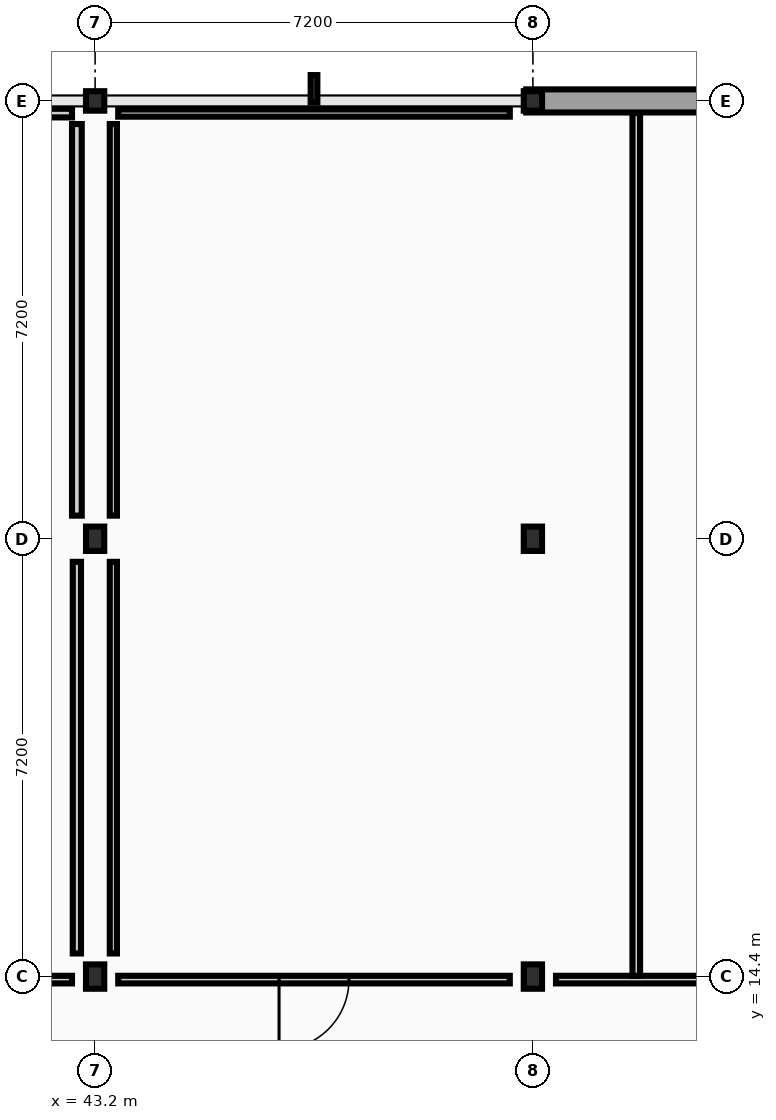
"""IFC4 building model, lengths in metres.
Left out: names, types, materials, properties, quantities, classifications, styles, units other than length and angle.
Written with IfcOpenShell. Run it as: python <this file> out.ifc"""

import sys

from ifc_helpers import new_model, si_unit, direction, frame, frame_2d, origin, origin_2d, place, context, subcontext, project, spatial, rectangle, i_section, extrude, element, fill, save


model = new_model("IFC4")
c1 = context("Model", 3, precision=1e-05, world=origin(), true_north=direction((0.0, 1.0)))
c2 = subcontext(c1, "Body", "Model", "MODEL_VIEW")
j1 = project(units=[si_unit("LENGTHUNIT", "METRE"), si_unit("PLANEANGLEUNIT", "RADIAN")], contexts=[c1])
p1 = place(None, origin())
s1 = spatial("IfcSite", under=j1, at=p1, CompositionType="ELEMENT")
p2 = place(p1, origin())
s2 = spatial("IfcBuilding", under=s1, at=p2, CompositionType="ELEMENT")
p3 = place(p2, frame((0.0, 0.0, 5.2)))
s3 = spatial("IfcBuildingStorey", under=s2, at=p3, CompositionType="ELEMENT", Elevation=5.2)
for number, where, z_axis, x_axis in (
    (1, (43.2, 14.4, 0.0), (0.0, 0.0, 1.0), (1.0, 0.0, 0.0)),
    (2, (43.2, 21.6, 0.0), (0.0, 0.0, 1.0), (1.0, 0.0, 0.0)),
):
    element("IfcColumn", number, at=place(p3, frame(where, z_axis=z_axis, x_axis=x_axis)), inside=s3, PredefinedType="COLUMN", context=c2, shape_type="SweptSolid", body=[
        extrude(i_section(OverallWidth=0.3, OverallDepth=0.4, WebThickness=0.013, FlangeThickness=0.024, FilletRadius=0.027, at=origin_2d()), origin(), (0.0, 0.0, 1.0), 4.4),
    ])
p4 = place(p3, frame((43.2, 28.8, 0.0), z_axis=(0.0, 0.0, 1.0), x_axis=(1.0, 0.0, 0.0)))
e3 = element("IfcColumn", 3, at=p4, inside=s3, PredefinedType="COLUMN", context=c2, shape_type="SweptSolid", body=[
    extrude(i_section(OverallWidth=0.3, OverallDepth=0.32, WebThickness=0.011, FlangeThickness=0.021, FilletRadius=0.027, at=origin_2d()), origin(), (0.0, 0.0, 1.0), 4.4),
])
for number, where, z_axis, x_axis in (
    (4, (50.4, 14.4, 0.0), (0.0, 0.0, 1.0), (1.0, 0.0, 0.0)),
    (5, (50.4, 21.6, 0.0), (0.0, 0.0, 1.0), (1.0, 0.0, 0.0)),
):
    element("IfcColumn", number, at=place(p3, frame(where, z_axis=z_axis, x_axis=x_axis)), inside=s3, PredefinedType="COLUMN", context=c2, shape_type="SweptSolid", body=[
        extrude(i_section(OverallWidth=0.3, OverallDepth=0.4, WebThickness=0.013, FlangeThickness=0.024, FilletRadius=0.027, at=origin_2d()), origin(), (0.0, 0.0, 1.0), 4.4),
    ])
p5 = place(p3, frame((50.4, 28.8, 0.0), z_axis=(0.0, 0.0, 1.0), x_axis=(1.0, 0.0, 0.0)))
e6 = element("IfcColumn", 6, at=p5, inside=s3, PredefinedType="COLUMN", context=c2, shape_type="SweptSolid", body=[
    extrude(i_section(OverallWidth=0.3, OverallDepth=0.32, WebThickness=0.011, FlangeThickness=0.021, FilletRadius=0.027, at=origin_2d()), origin(), (0.0, 0.0, 1.0), 4.4),
])
p6 = place(p3, frame((57.41, 28.8, 0.0), z_axis=(0.0, 0.0, 1.0), x_axis=(-1.0, 0.0, 0.0)))
e7 = element("IfcWall", 7, at=p6, inside=s3, PredefinedType="STANDARD", context=c2, shape_type="SweptSolid", body=[
    extrude(rectangle(XDim=7.12, YDim=0.38, at=frame_2d((3.56, 0.0))), origin(), (0.0, 0.0, 1.0), 3.88),
])
p7 = place(p6, frame((1.672, 0.0, 0.95)))
e8 = element("IfcOpeningElement", 8, at=p7, cuts=e7, PredefinedType="OPENING", context=c2, shape_type="SweptSolid", body=[
    extrude(rectangle(XDim=0.928, YDim=1.332, at=frame_2d((0.464, 0.666))), frame((0.0, 0.2, 0.0), z_axis=(0.0, -1.0, 0.0), x_axis=(1.0, 0.0, 0.0)), (0.0, 0.0, 1.0), 0.4),
])
p8 = place(p3, frame((36.38, 14.35, 0.0), z_axis=(0.0, 0.0, 1.0), x_axis=(1.0, 0.0, 0.0)))
e9 = element("IfcWall", 9, at=p8, inside=s3, PredefinedType="PARTITIONING", context=c2, shape_type="SweptSolid", body=[
    extrude(rectangle(XDim=6.44, YDim=0.125, at=frame_2d((3.22, 0.0))), origin(), (0.0, 0.0, 1.0), 3.88),
])
p9 = place(p8, frame((2.741, 0.0, 0.0)))
e10 = element("IfcOpeningElement", 10, at=p9, cuts=e9, PredefinedType="OPENING", context=c2, shape_type="SweptSolid", body=[
    extrude(rectangle(XDim=0.958, YDim=2.124, at=frame_2d((0.479, 1.062))), frame((0.0, 0.073, 0.0), z_axis=(0.0, -1.0, 0.0), x_axis=(1.0, 0.0, 0.0)), (0.0, 0.0, 1.0), 0.145),
])
p10 = place(p3, frame((43.58, 14.35, 0.0), z_axis=(0.0, 0.0, 1.0), x_axis=(1.0, 0.0, 0.0)))
e11 = element("IfcWall", 11, at=p10, inside=s3, PredefinedType="PARTITIONING", context=c2, shape_type="SweptSolid", body=[
    extrude(rectangle(XDim=6.44, YDim=0.125, at=frame_2d((3.22, 0.0))), origin(), (0.0, 0.0, 1.0), 3.88),
])
p11 = place(p10, frame((2.645, 0.0, 0.0)))
e12 = element("IfcOpeningElement", 12, at=p11, cuts=e11, PredefinedType="OPENING", context=c2, shape_type="SweptSolid", body=[
    extrude(rectangle(XDim=1.15, YDim=2.15, at=frame_2d((0.575, 1.075))), frame((0.0, 0.073, 0.0), z_axis=(0.0, -1.0, 0.0), x_axis=(1.0, 0.0, 0.0)), (0.0, 0.0, 1.0), 0.145),
])
p12 = place(p3, frame((50.78, 14.35, 0.0), z_axis=(0.0, 0.0, 1.0), x_axis=(1.0, 0.0, 0.0)))
e13 = element("IfcWall", 13, at=p12, inside=s3, PredefinedType="PARTITIONING", context=c2, shape_type="SweptSolid", body=[
    extrude(rectangle(XDim=6.44, YDim=0.125, at=frame_2d((3.22, 0.0))), origin(), (0.0, 0.0, 1.0), 3.88),
])
p13 = place(p12, frame((3.43, 0.0, 0.0)))
e14 = element("IfcOpeningElement", 14, at=p13, cuts=e13, PredefinedType="OPENING", context=c2, shape_type="SweptSolid", body=[
    extrude(rectangle(XDim=0.9, YDim=2.1, at=frame_2d((0.45, 1.05))), frame((0.0, 0.073, 0.0), z_axis=(0.0, -1.0, 0.0), x_axis=(1.0, 0.0, 0.0)), (0.0, 0.0, 1.0), 0.145),
])
p14 = place(p3, frame((36.38, 28.6, 0.0), z_axis=(0.0, 0.0, 1.0), x_axis=(1.0, 0.0, 0.0)))
e15 = element("IfcWall", 15, at=p14, inside=s3, PredefinedType="PARTITIONING", context=c2, shape_type="SweptSolid", body=[
    extrude(rectangle(XDim=6.44, YDim=0.142, at=frame_2d((3.22, 0.0))), origin(), (0.0, 0.0, 1.0), 3.88),
])
p15 = place(p3, frame((43.58, 28.6, 0.0), z_axis=(0.0, 0.0, 1.0), x_axis=(1.0, 0.0, 0.0)))
e16 = element("IfcWall", 16, at=p15, inside=s3, PredefinedType="PARTITIONING", context=c2, shape_type="SweptSolid", body=[
    extrude(rectangle(XDim=6.44, YDim=0.118, at=frame_2d((3.22, 0.0))), origin(), (0.0, 0.0, 1.0), 3.88),
])
p16 = place(p3, frame((42.9, 14.78, 0.0), z_axis=(0.0, 0.0, 1.0), x_axis=(0.0, 1.0, 0.0)))
e17 = element("IfcWall", 17, at=p16, inside=s3, PredefinedType="PARTITIONING", context=c2, shape_type="SweptSolid", body=[
    extrude(rectangle(XDim=6.44, YDim=0.135, at=frame_2d((3.22, 0.0))), origin(), (0.0, 0.0, 1.0), 4.185),
])
p17 = place(p3, frame((42.9, 21.98, 0.0), z_axis=(0.0, 0.0, 1.0), x_axis=(0.0, 1.0, 0.0)))
e18 = element("IfcWall", 18, at=p17, inside=s3, PredefinedType="PARTITIONING", context=c2, shape_type="SweptSolid", body=[
    extrude(rectangle(XDim=6.44, YDim=0.16, at=frame_2d((3.22, 0.0))), origin(), (0.0, 0.0, 1.0), 3.88),
])
for number, where, z_axis, x_axis in (
    (19, (43.5, 14.78, 0.0), (0.0, 0.0, 1.0), (0.0, 1.0, 0.0)),
    (20, (43.5, 21.98, 0.0), (0.0, 0.0, 1.0), (0.0, 1.0, 0.0)),
):
    element("IfcWall", number, at=place(p3, frame(where, z_axis=z_axis, x_axis=x_axis)), inside=s3, PredefinedType="PARTITIONING", context=c2, shape_type="SweptSolid", body=[
        extrude(rectangle(XDim=6.44, YDim=0.118, at=frame_2d((3.22, 0.0))), origin(), (0.0, 0.0, 1.0), 4.185),
    ])
p18 = place(p3, frame((52.1, 14.413, 0.0), z_axis=(0.0, 0.0, 1.0), x_axis=(0.0, 1.0, 0.0)))
e21 = element("IfcWall", 21, at=p18, inside=s3, PredefinedType="PARTITIONING", context=c2, shape_type="SweptSolid", body=[
    extrude(rectangle(XDim=14.188, YDim=0.125, at=frame_2d((7.094, 0.0))), origin(), (0.0, 0.0, 1.0), 4.185),
])
p19 = place(p11, frame((1.15, 0.0, 0.0), z_axis=(0.0, 0.0, 1.0), x_axis=(-1.0, 0.0, 0.0)))
e22 = element("IfcDoor", 22, at=p19, inside=s3, OperationType="SINGLE_SWING_LEFT", PredefinedType="DOOR", context=c2, shape_type="SweptSolid", body=[
    extrude(rectangle(XDim=1.15, YDim=2.15, at=frame_2d((0.575, 1.075))), frame((0.0, 0.025, 0.0), z_axis=(0.0, -1.0, 0.0), x_axis=(1.0, 0.0, 0.0)), (0.0, 0.0, 1.0), 0.05),
])
fill(e12, e22)
save(model, sys.argv[1])
